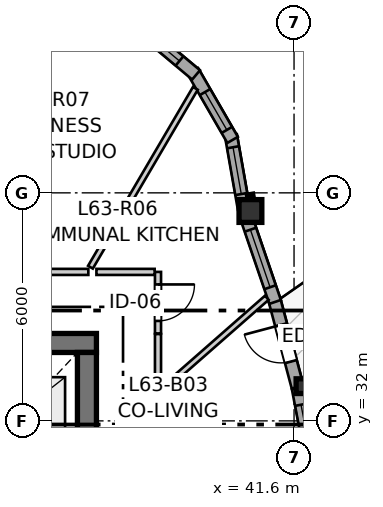
"""IFC4 building model, lengths in metres.
Left out: names, types, materials, properties, quantities, classifications, styles, units other than length and angle.
Written with IfcOpenShell. Run it as: python <this file> out.ifc"""

import sys

from ifc_helpers import new_model, si_unit, direction, frame, frame_2d, origin, origin_2d, place, context, subcontext, project, spatial, rectangle, i_section, extrude, source, transform, mapped, element, fill, save


model = new_model("IFC4")
c1 = context("Model", 3, precision=1e-05, world=origin(), true_north=direction((0.0, 1.0)))
c2 = subcontext(c1, "Body", "Model", "MODEL_VIEW")
j1 = project(units=[si_unit("LENGTHUNIT", "METRE"), si_unit("PLANEANGLEUNIT", "RADIAN")], contexts=[c1])
p1 = place(None, origin())
s1 = spatial("IfcSite", under=j1, at=p1, CompositionType="ELEMENT")
p2 = place(p1, origin())
s2 = spatial("IfcBuilding", under=s1, at=p2, CompositionType="ELEMENT")
p3 = place(p2, frame((0.0, 0.0, 211.6)))
s3 = spatial("IfcBuildingStorey", under=s2, at=p3, CompositionType="ELEMENT", Elevation=211.6)
p4 = place(p3, frame((36.4, 34.05, 0.0), z_axis=(0.0, 0.0, 1.0), x_axis=(-1.0, 0.0, 0.0)))
e1 = element("IfcWall", 1, at=p4, inside=s3, PredefinedType="SHEAR", context=c2, shape_type="SweptSolid", body=[
    extrude(rectangle(XDim=12.1, YDim=0.5, at=frame_2d((6.05, 0.0))), origin(), (0.0, 0.0, 1.0), 2.96),
])
p5 = place(p3, frame((36.15, 18.2, 0.0), z_axis=(0.0, 0.0, 1.0), x_axis=(0.0, 1.0, 0.0)))
e2 = element("IfcWall", 2, at=p5, inside=s3, PredefinedType="SHEAR", context=c2, shape_type="SweptSolid", body=[
    extrude(rectangle(XDim=15.6, YDim=0.5, at=frame_2d((7.8, 0.0))), origin(), (0.0, 0.0, 1.0), 2.96),
])
p6 = place(p5, frame((4.25, 0.0, 0.0)))
e3 = element("IfcOpeningElement", 3, at=p6, cuts=e2, PredefinedType="OPENING", context=c2, shape_type="SweptSolid", body=[
    extrude(rectangle(XDim=1.1, YDim=2.15, at=frame_2d((0.55, 1.075))), frame((0.0, 0.26, 0.0), z_axis=(0.0, -1.0, 0.0), x_axis=(1.0, 0.0, 0.0)), (0.0, 0.0, 1.0), 0.52),
])
p7 = place(p5, frame((10.25, 0.0, 0.0)))
e4 = element("IfcOpeningElement", 4, at=p7, cuts=e2, PredefinedType="OPENING", context=c2, shape_type="SweptSolid", body=[
    extrude(rectangle(XDim=1.1, YDim=2.15, at=frame_2d((0.55, 1.075))), frame((0.0, 0.26, 0.0), z_axis=(0.0, -1.0, 0.0), x_axis=(1.0, 0.0, 0.0)), (0.0, 0.0, 1.0), 0.52),
])
m1 = source(origin(), c2, "Body", "SweptSolid", [
    extrude(i_section(OverallWidth=0.398, OverallDepth=0.387, WebThickness=0.019, FlangeThickness=0.03, FilletRadius=0.015, at=origin_2d()), origin(), (0.0, 0.0, 1.0), 2.96),
])
p8 = place(p3, frame((41.854, 32.914, 0.0), z_axis=(0.0, 0.0, 1.0), x_axis=(1.0, 0.0, 0.0)))
e5 = element("IfcColumn", 5, at=p8, inside=s3, PredefinedType="PILASTER", context=c2, shape_type="MappedRepresentation", body=[
    mapped(m1, transform((0.0, 0.0, 0.0), x_axis=(1.0, 0.0, 0.0), y_axis=(0.0, 1.0, 0.0), z_axis=(0.0, 0.0, 1.0), scale=1.0)),
])
m2 = source(origin(), c2, "Body", "SweptSolid", [
    extrude(rectangle(XDim=0.6, YDim=0.6, at=origin_2d()), origin(), (0.0, 0.0, 1.0), 2.96),
])
p9 = place(p3, frame((40.452, 37.522, 0.0), z_axis=(0.0, 0.0, 1.0), x_axis=(1.0, 0.0, 0.0)))
e6 = element("IfcColumn", 6, at=p9, inside=s3, PredefinedType="COLUMN", context=c2, shape_type="MappedRepresentation", body=[
    mapped(m2, transform((0.0, 0.0, 0.0), x_axis=(1.0, 0.0, 0.0), y_axis=(0.0, 1.0, 0.0), z_axis=(0.0, 0.0, 1.0), scale=1.0)),
])
p10 = place(p3, frame((42.141, 30.542, 0.0), z_axis=(0.0, 0.0, 1.0), x_axis=(-0.186632734065, 0.982429754525, 0.0)))
e7 = element("IfcWall", 7, at=p10, inside=s3, PredefinedType="SOLIDWALL", context=c2, shape_type="SweptSolid", body=[
    extrude(rectangle(XDim=2.364, YDim=0.32, at=frame_2d((1.182, 0.0))), origin(), (0.0, 0.0, 1.0), 2.58),
])
p11 = place(p10, frame((0.467, 0.0, 0.82)))
e8 = element("IfcOpeningElement", 8, at=p11, cuts=e7, PredefinedType="OPENING", context=c2, shape_type="SweptSolid", body=[
    extrude(rectangle(XDim=1.45, YDim=1.25, at=frame_2d((0.725, 0.625))), frame((0.0, 0.17, 0.0), z_axis=(0.0, -1.0, 0.0), x_axis=(1.0, 0.0, 0.0)), (0.0, 0.0, 1.0), 0.34),
])
p12 = place(p3, frame((41.694, 32.892, 0.0), z_axis=(0.0, 0.0, 1.0), x_axis=(-0.257068132003, 0.966393282007, 0.0)))
e9 = element("IfcWall", 9, at=p12, inside=s3, PredefinedType="SOLIDWALL", context=c2, shape_type="SweptSolid", body=[
    extrude(rectangle(XDim=2.403, YDim=0.32, at=frame_2d((1.201, 0.0))), origin(), (0.0, 0.0, 1.0), 2.58),
])
p13 = place(p12, frame((0.691, 0.0, 0.0)))
e10 = element("IfcOpeningElement", 10, at=p13, cuts=e9, PredefinedType="OPENING", context=c2, shape_type="SweptSolid", body=[
    extrude(rectangle(XDim=1.0, YDim=2.1, at=frame_2d((0.5, 1.05))), frame((0.0, 0.17, 0.0), z_axis=(0.0, -1.0, 0.0), x_axis=(1.0, 0.0, 0.0)), (0.0, 0.0, 1.0), 0.34),
])
p14 = place(p3, frame((41.102, 35.13, 0.0), z_axis=(0.0, 0.0, 1.0), x_axis=(-0.323685265908, 0.946164810503, 0.0)))
e11 = element("IfcWall", 11, at=p14, inside=s3, PredefinedType="SOLIDWALL", context=c2, shape_type="SweptSolid", body=[
    extrude(rectangle(XDim=2.384, YDim=0.32, at=frame_2d((1.192, 0.0))), origin(), (0.0, 0.0, 1.0), 2.58),
])
p15 = place(p14, frame((0.408, 0.0, 0.82)))
e12 = element("IfcOpeningElement", 12, at=p15, cuts=e11, PredefinedType="OPENING", context=c2, shape_type="SweptSolid", body=[
    extrude(rectangle(XDim=1.6, YDim=1.35, at=frame_2d((0.8, 0.675))), frame((0.0, 0.17, 0.0), z_axis=(0.0, -1.0, 0.0), x_axis=(1.0, 0.0, 0.0)), (0.0, 0.0, 1.0), 0.34),
])
p16 = place(p3, frame((40.279, 37.583, 0.0), z_axis=(0.0, 0.0, 1.0), x_axis=(-0.173671780312, 0.984803590937, 0.0)))
e13 = element("IfcWall", 13, at=p16, inside=s3, PredefinedType="SOLIDWALL", context=c2, shape_type="SweptSolid", body=[
    extrude(rectangle(XDim=1.962, YDim=0.32, at=frame_2d((0.981, 0.0))), origin(), (0.0, 0.0, 1.0), 2.58),
])
p17 = place(p16, frame((0.391, 0.0, 0.82)))
e14 = element("IfcOpeningElement", 14, at=p17, cuts=e13, PredefinedType="OPENING", context=c2, shape_type="SweptSolid", body=[
    extrude(rectangle(XDim=1.25, YDim=1.35, at=frame_2d((0.625, 0.675))), frame((0.0, 0.17, 0.0), z_axis=(0.0, -1.0, 0.0), x_axis=(1.0, 0.0, 0.0)), (0.0, 0.0, 1.0), 0.34),
])
p18 = place(p3, frame((39.983, 39.393, 0.0), z_axis=(0.0, 0.0, 1.0), x_axis=(-0.499995423472, 0.866028046028, 0.0)))
e15 = element("IfcWall", 15, at=p18, inside=s3, PredefinedType="SOLIDWALL", context=c2, shape_type="SweptSolid", body=[
    extrude(rectangle(XDim=2.09, YDim=0.32, at=frame_2d((1.045, 0.0))), origin(), (0.0, 0.0, 1.0), 2.58),
])
p19 = place(p18, frame((0.303, 0.0, 0.82)))
e16 = element("IfcOpeningElement", 16, at=p19, cuts=e15, PredefinedType="OPENING", context=c2, shape_type="SweptSolid", body=[
    extrude(rectangle(XDim=1.15, YDim=1.2, at=frame_2d((0.575, 0.6))), frame((0.0, 0.17, 0.0), z_axis=(0.0, -1.0, 0.0), x_axis=(1.0, 0.0, 0.0)), (0.0, 0.0, 1.0), 0.34),
])
p20 = place(p3, frame((39.022, 41.104, 0.0), z_axis=(0.0, 0.0, 1.0), x_axis=(-0.766072824549, 0.642753784499, 0.0)))
e17 = element("IfcWall", 17, at=p20, inside=s3, PredefinedType="SOLIDWALL", context=c2, shape_type="SweptSolid", body=[
    extrude(rectangle(XDim=2.091, YDim=0.32, at=frame_2d((1.045, 0.0))), origin(), (0.0, 0.0, 1.0), 2.58),
])
p21 = place(p20, frame((0.57, 0.0, 0.82)))
e18 = element("IfcOpeningElement", 18, at=p21, cuts=e17, PredefinedType="OPENING", context=c2, shape_type="SweptSolid", body=[
    extrude(rectangle(XDim=0.95, YDim=1.35, at=frame_2d((0.475, 0.675))), frame((0.0, 0.17, 0.0), z_axis=(0.0, -1.0, 0.0), x_axis=(1.0, 0.0, 0.0)), (0.0, 0.0, 1.0), 0.34),
])
p22 = place(p3, frame((30.474, 35.92, 0.0), z_axis=(0.0, 0.0, 1.0), x_axis=(1.0, 0.0, 0.0)))
e19 = element("IfcWall", 19, at=p22, inside=s3, PredefinedType="PARTITIONING", context=c2, shape_type="SweptSolid", body=[
    extrude(rectangle(XDim=5.713, YDim=0.16, at=frame_2d((2.856, 0.0))), origin(), (0.0, 0.0, 1.0), 2.96),
])
p23 = place(p22, frame((2.375, 0.0, 0.0)))
e20 = element("IfcOpeningElement", 20, at=p23, cuts=e19, PredefinedType="OPENING", context=c2, shape_type="SweptSolid", body=[
    extrude(rectangle(XDim=0.96, YDim=2.1, at=frame_2d((0.48, 1.05))), frame((0.0, 0.09, 0.0), z_axis=(0.0, -1.0, 0.0), x_axis=(1.0, 0.0, 0.0)), (0.0, 0.0, 1.0), 0.18),
])
p24 = place(p3, frame((38.02, 32.748, 0.0), z_axis=(0.0, 0.0, 1.0), x_axis=(0.0, -1.0, 0.0)))
e21 = element("IfcWall", 21, at=p24, inside=s3, PredefinedType="PARTITIONING", context=c2, shape_type="SweptSolid", body=[
    extrude(rectangle(XDim=4.71, YDim=0.16, at=frame_2d((2.355, 0.0))), origin(), (0.0, 0.0, 1.0), 2.628),
])
p25 = place(p24, frame((1.897, 0.0, 0.0)))
e22 = element("IfcOpeningElement", 22, at=p25, cuts=e21, PredefinedType="OPENING", context=c2, shape_type="SweptSolid", body=[
    extrude(rectangle(XDim=0.92, YDim=2.1, at=frame_2d((0.46, 1.05))), frame((0.0, 0.09, 0.0), z_axis=(0.0, -1.0, 0.0), x_axis=(1.0, 0.0, 0.0)), (0.0, 0.0, 1.0), 0.18),
])
p26 = place(p3, frame((38.02, 35.92, 0.0), z_axis=(0.0, 0.0, 1.0), x_axis=(0.0, -1.0, 0.0)))
e23 = element("IfcWall", 23, at=p26, inside=s3, PredefinedType="PARTITIONING", context=c2, shape_type="SweptSolid", body=[
    extrude(rectangle(XDim=1.62, YDim=0.16, at=frame_2d((0.81, 0.0))), origin(), (0.0, 0.0, 1.0), 2.628),
])
p27 = place(p26, frame((0.33, 0.0, 0.0)))
e24 = element("IfcOpeningElement", 24, at=p27, cuts=e23, PredefinedType="OPENING", context=c2, shape_type="SweptSolid", body=[
    extrude(rectangle(XDim=0.96, YDim=2.1, at=frame_2d((0.48, 1.05))), frame((0.0, 0.09, 0.0), z_axis=(0.0, -1.0, 0.0), x_axis=(1.0, 0.0, 0.0)), (0.0, 0.0, 1.0), 0.18),
])
p28 = place(p3, frame((36.242, 36.044, 0.0), z_axis=(0.0, 0.0, 1.0), x_axis=(0.50599508157, 0.862536362959, 0.0)))
e25 = element("IfcWall", 25, at=p28, inside=s3, PredefinedType="PARTITIONING", context=c2, shape_type="SweptSolid", body=[
    extrude(rectangle(XDim=5.456, YDim=0.145, at=frame_2d((2.728, 0.0))), origin(), (0.0, 0.0, 1.0), 2.96),
])
p29 = place(p3, frame((38.154, 32.845, 0.0), z_axis=(0.0, 0.0, 1.0), x_axis=(0.751793032372, 0.659399148071, 0.0)))
e26 = element("IfcWall", 26, at=p29, inside=s3, PredefinedType="PARTITIONING", context=c2, shape_type="SweptSolid", body=[
    extrude(rectangle(XDim=3.631, YDim=0.145, at=frame_2d((1.815, 0.0))), origin(), (0.0, 0.0, 1.0), 2.96),
])
p30 = place(p3, frame((36.4, 35.92, 0.0), z_axis=(0.0, 0.0, 1.0), x_axis=(1.0, 0.0, 0.0)))
e27 = element("IfcWall", 27, at=p30, inside=s3, PredefinedType="PARTITIONING", context=c2, shape_type="SweptSolid", body=[
    extrude(rectangle(XDim=1.532, YDim=0.16, at=frame_2d((0.766, 0.0))), origin(), (0.0, 0.0, 1.0), 2.96),
])
p31 = place(p3, frame((38.02, 32.938, 0.0), z_axis=(0.0, 0.0, 1.0), x_axis=(0.0, 1.0, 0.0)))
e28 = element("IfcWall", 28, at=p31, inside=s3, PredefinedType="PARTITIONING", context=c2, shape_type="SweptSolid", body=[
    extrude(rectangle(XDim=1.347, YDim=0.16, at=frame_2d((0.674, 0.0))), origin(), (0.0, 0.0, 1.0), 2.628),
])
m3 = source(origin(), c2, "Body", "SweptSolid", [
    extrude(rectangle(XDim=1.45, YDim=1.25, at=frame_2d((0.725, 0.625))), frame((0.0, 0.03, 0.0), z_axis=(0.0, -1.0, 0.0), x_axis=(1.0, 0.0, 0.0)), (0.0, 0.0, 1.0), 0.06),
])
p32 = place(p11, origin())
e29 = element("IfcWindow", 29, at=p32, inside=s3, PartitioningType="SINGLE_PANEL", PredefinedType="WINDOW", context=c2, shape_type="MappedRepresentation", body=[
    mapped(m3, transform((0.0, 0.0, 0.0), x_axis=(1.0, 0.0, 0.0), y_axis=(0.0, 1.0, 0.0), z_axis=(0.0, 0.0, 1.0), scale=1.0)),
])
fill(e8, e29)
m4 = source(origin(), c2, "Body", "SweptSolid", [
    extrude(rectangle(XDim=1.0, YDim=2.1, at=frame_2d((0.5, 1.05))), frame((0.0, 0.025, 0.0), z_axis=(0.0, -1.0, 0.0), x_axis=(1.0, 0.0, 0.0)), (0.0, 0.0, 1.0), 0.05),
])
p33 = place(p13, origin())
e30 = element("IfcDoor", 30, at=p33, inside=s3, OperationType="SINGLE_SWING_RIGHT", PredefinedType="DOOR", context=c2, shape_type="MappedRepresentation", body=[
    mapped(m4, transform((0.0, 0.0, 0.0), x_axis=(1.0, 0.0, 0.0), y_axis=(0.0, 1.0, 0.0), z_axis=(0.0, 0.0, 1.0), scale=1.0)),
])
fill(e10, e30)
m5 = source(origin(), c2, "Body", "SweptSolid", [
    extrude(rectangle(XDim=1.6, YDim=1.35, at=frame_2d((0.8, 0.675))), frame((0.0, 0.03, 0.0), z_axis=(0.0, -1.0, 0.0), x_axis=(1.0, 0.0, 0.0)), (0.0, 0.0, 1.0), 0.06),
])
p34 = place(p15, origin())
e31 = element("IfcWindow", 31, at=p34, inside=s3, PartitioningType="SINGLE_PANEL", PredefinedType="WINDOW", context=c2, shape_type="MappedRepresentation", body=[
    mapped(m5, transform((0.0, 0.0, 0.0), x_axis=(1.0, 0.0, 0.0), y_axis=(0.0, 1.0, 0.0), z_axis=(0.0, 0.0, 1.0), scale=1.0)),
])
fill(e12, e31)
m6 = source(origin(), c2, "Body", "SweptSolid", [
    extrude(rectangle(XDim=1.25, YDim=1.35, at=frame_2d((0.625, 0.675))), frame((0.0, 0.03, 0.0), z_axis=(0.0, -1.0, 0.0), x_axis=(1.0, 0.0, 0.0)), (0.0, 0.0, 1.0), 0.06),
])
p35 = place(p17, origin())
e32 = element("IfcWindow", 32, at=p35, inside=s3, PartitioningType="SINGLE_PANEL", PredefinedType="WINDOW", context=c2, shape_type="MappedRepresentation", body=[
    mapped(m6, transform((0.0, 0.0, 0.0), x_axis=(1.0, 0.0, 0.0), y_axis=(0.0, 1.0, 0.0), z_axis=(0.0, 0.0, 1.0), scale=1.0)),
])
fill(e14, e32)
m7 = source(origin(), c2, "Body", "SweptSolid", [
    extrude(rectangle(XDim=1.15, YDim=1.2, at=frame_2d((0.575, 0.6))), frame((0.0, 0.03, 0.0), z_axis=(0.0, -1.0, 0.0), x_axis=(1.0, 0.0, 0.0)), (0.0, 0.0, 1.0), 0.06),
])
p36 = place(p19, origin())
e33 = element("IfcWindow", 33, at=p36, inside=s3, PartitioningType="SINGLE_PANEL", PredefinedType="WINDOW", context=c2, shape_type="MappedRepresentation", body=[
    mapped(m7, transform((0.0, 0.0, 0.0), x_axis=(1.0, 0.0, 0.0), y_axis=(0.0, 1.0, 0.0), z_axis=(0.0, 0.0, 1.0), scale=1.0)),
])
fill(e16, e33)
m8 = source(origin(), c2, "Body", "SweptSolid", [
    extrude(rectangle(XDim=0.95, YDim=1.35, at=frame_2d((0.475, 0.675))), frame((0.0, 0.03, 0.0), z_axis=(0.0, -1.0, 0.0), x_axis=(1.0, 0.0, 0.0)), (0.0, 0.0, 1.0), 0.06),
])
p37 = place(p21, origin())
e34 = element("IfcWindow", 34, at=p37, inside=s3, PartitioningType="SINGLE_PANEL", PredefinedType="WINDOW", context=c2, shape_type="MappedRepresentation", body=[
    mapped(m8, transform((0.0, 0.0, 0.0), x_axis=(1.0, 0.0, 0.0), y_axis=(0.0, 1.0, 0.0), z_axis=(0.0, 0.0, 1.0), scale=1.0)),
])
fill(e18, e34)
m9 = source(origin(), c2, "Body", "SweptSolid", [
    extrude(rectangle(XDim=0.96, YDim=2.1, at=frame_2d((0.48, 1.05))), frame((0.0, 0.025, 0.0), z_axis=(0.0, -1.0, 0.0), x_axis=(1.0, 0.0, 0.0)), (0.0, 0.0, 1.0), 0.05),
])
p38 = place(p27, origin())
e35 = element("IfcDoor", 35, at=p38, inside=s3, OperationType="SINGLE_SWING_LEFT", PredefinedType="DOOR", context=c2, shape_type="MappedRepresentation", body=[
    mapped(m9, transform((0.0, 0.0, 0.0), x_axis=(1.0, 0.0, 0.0), y_axis=(0.0, 1.0, 0.0), z_axis=(0.0, 0.0, 1.0), scale=1.0)),
])
fill(e24, e35)
save(model, sys.argv[1])
